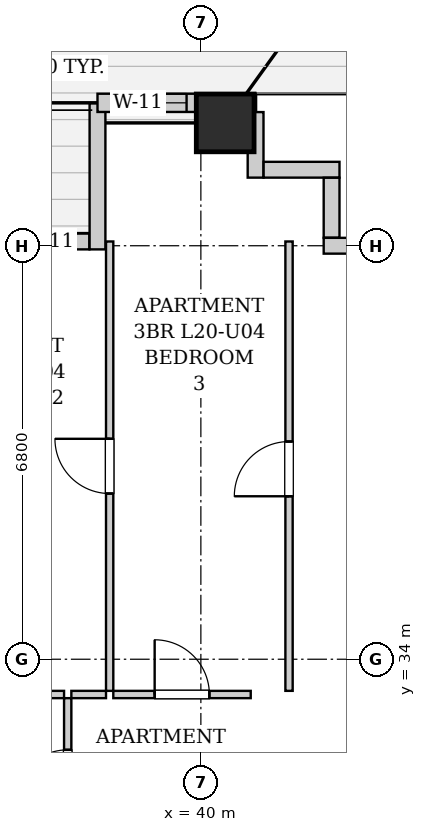
"""IFC4 building model, lengths in metres.
Left out: names, types, materials, properties, quantities, classifications, styles, units other than length and angle.
Written with IfcOpenShell. Run it as: python <this file> out.ifc"""

import sys

from ifc_helpers import new_model, si_unit, direction, frame, frame_2d, origin, origin_2d, place, context, subcontext, project, spatial, rectangle, extrude, element, fill, save


model = new_model("IFC4")
c1 = context("Model", 3, precision=1e-05, world=origin(), true_north=direction((0.0, 1.0)))
c2 = subcontext(c1, "Body", "Model", "MODEL_VIEW")
j1 = project(units=[si_unit("LENGTHUNIT", "METRE"), si_unit("PLANEANGLEUNIT", "RADIAN")], contexts=[c1])
p1 = place(None, origin())
s1 = spatial("IfcSite", under=j1, at=p1, CompositionType="ELEMENT")
p2 = place(p1, origin())
s2 = spatial("IfcBuilding", under=s1, at=p2, CompositionType="ELEMENT")
p3 = place(p2, frame((0.0, 0.0, 75.1)))
s3 = spatial("IfcBuildingStorey", under=s2, at=p3, CompositionType="ELEMENT", Elevation=75.1)
p4 = place(p3, frame((40.4, 42.82, 0.0), z_axis=(0.0, 0.0, 1.0), x_axis=(1.0, 0.0, 0.0)))
e1 = element("IfcColumn", 1, at=p4, inside=s3, PredefinedType="COLUMN", context=c2, shape_type="SweptSolid", body=[
    extrude(rectangle(XDim=0.95, YDim=0.95, at=origin_2d()), origin(), (0.0, 0.0, 1.0), 3.2),
])
p5 = place(p3, frame((33.834, 40.87, 0.0), z_axis=(0.0, 0.0, 1.0), x_axis=(1.0, 0.0, 0.0)))
e2 = element("IfcWall", 2, at=p5, inside=s3, PredefinedType="SOLIDWALL", context=c2, shape_type="SweptSolid", body=[
    extrude(rectangle(XDim=4.332, YDim=0.26, at=frame_2d((2.166, 0.0))), origin(), (0.0, 0.0, 1.0), 2.94),
])
p6 = place(p5, frame((1.616, 0.0, 0.0)))
e3 = element("IfcOpeningElement", 3, at=p6, cuts=e2, PredefinedType="OPENING", context=c2, shape_type="SweptSolid", body=[
    extrude(rectangle(XDim=1.1, YDim=2.0, at=frame_2d((0.55, 1.0))), frame((0.0, 0.14, 0.0), z_axis=(0.0, -1.0, 0.0), x_axis=(1.0, 0.0, 0.0)), (0.0, 0.0, 1.0), 0.28),
])
p7 = place(p5, frame((2.876, 0.0, 0.55)))
e4 = element("IfcOpeningElement", 4, at=p7, cuts=e2, PredefinedType="OPENING", context=c2, shape_type="SweptSolid", body=[
    extrude(rectangle(XDim=0.85, YDim=1.2, at=frame_2d((0.425, 0.6))), frame((0.0, 0.14, 0.0), z_axis=(0.0, -1.0, 0.0), x_axis=(1.0, 0.0, 0.0)), (0.0, 0.0, 1.0), 0.28),
])
p8 = place(p3, frame((38.3, 40.74, 0.0), z_axis=(0.0, 0.0, 1.0), x_axis=(0.0, 1.0, 0.0)))
e5 = element("IfcWall", 5, at=p8, inside=s3, PredefinedType="SOLIDWALL", context=c2, shape_type="SweptSolid", body=[
    extrude(rectangle(XDim=2.4, YDim=0.26, at=frame_2d((1.2, 0.0))), origin(), (0.0, 0.0, 1.0), 2.94),
])
p9 = place(p3, frame((38.3, 43.15, 0.0), z_axis=(0.0, 0.0, 1.0), x_axis=(1.0, 0.0, 0.0)))
e6 = element("IfcWall", 6, at=p9, inside=s3, PredefinedType="SOLIDWALL", context=c2, shape_type="SweptSolid", body=[
    extrude(rectangle(XDim=2.6, YDim=0.3, at=frame_2d((1.3, 0.0))), origin(), (0.0, 0.0, 1.0), 2.94),
])
p10 = place(p9, frame((0.615, 0.0, 0.55)))
e7 = element("IfcOpeningElement", 7, at=p10, cuts=e6, PredefinedType="OPENING", context=c2, shape_type="SweptSolid", body=[
    extrude(rectangle(XDim=0.85, YDim=1.2, at=frame_2d((0.425, 0.6))), frame((0.0, 0.16, 0.0), z_axis=(0.0, -1.0, 0.0), x_axis=(1.0, 0.0, 0.0)), (0.0, 0.0, 1.0), 0.32),
])
p11 = place(p3, frame((40.9, 42.998, 0.0), z_axis=(0.0, 0.0, 1.0), x_axis=(0.0, -1.0, 0.0)))
e8 = element("IfcWall", 8, at=p11, inside=s3, PredefinedType="SOLIDWALL", context=c2, shape_type="SweptSolid", body=[
    extrude(rectangle(XDim=1.078, YDim=0.26, at=frame_2d((0.539, 0.0))), origin(), (0.0, 0.0, 1.0), 2.94),
])
p12 = place(p3, frame((41.032, 42.05, 0.0), z_axis=(0.0, 0.0, 1.0), x_axis=(1.0, 0.0, 0.0)))
e9 = element("IfcWall", 9, at=p12, inside=s3, PredefinedType="SOLIDWALL", context=c2, shape_type="SweptSolid", body=[
    extrude(rectangle(XDim=1.248, YDim=0.26, at=frame_2d((0.624, 0.0))), origin(), (0.0, 0.0, 1.0), 2.94),
])
p13 = place(p3, frame((42.15, 41.918, 0.0), z_axis=(0.0, 0.0, 1.0), x_axis=(0.0, -1.0, 0.0)))
e10 = element("IfcWall", 10, at=p13, inside=s3, PredefinedType="SOLIDWALL", context=c2, shape_type="SweptSolid", body=[
    extrude(rectangle(XDim=0.986, YDim=0.26, at=frame_2d((0.493, 0.0))), origin(), (0.0, 0.0, 1.0), 2.94),
])
p14 = place(p3, frame((42.02, 40.8, 0.0), z_axis=(0.0, 0.0, 1.0), x_axis=(1.0, 0.0, 0.0)))
e11 = element("IfcWall", 11, at=p14, inside=s3, PredefinedType="SOLIDWALL", context=c2, shape_type="SweptSolid", body=[
    extrude(rectangle(XDim=1.078, YDim=0.26, at=frame_2d((0.539, 0.0))), origin(), (0.0, 0.0, 1.0), 2.94),
])
p15 = place(p3, frame((37.81, 30.76, 0.0), z_axis=(0.0, 0.0, 1.0), x_axis=(0.0, 1.0, 0.0)))
e12 = element("IfcWall", 12, at=p15, inside=s3, PredefinedType="PARTITIONING", context=c2, shape_type="SweptSolid", body=[
    extrude(rectangle(XDim=2.6, YDim=0.12, at=frame_2d((1.3, 0.0))), origin(), (0.0, 0.0, 1.0), 2.94),
])
p16 = place(p15, frame((0.85, 0.0, 0.0)))
e13 = element("IfcOpeningElement", 13, at=p16, cuts=e12, PredefinedType="OPENING", context=c2, shape_type="SweptSolid", body=[
    extrude(rectangle(XDim=0.9, YDim=2.05, at=frame_2d((0.45, 1.025))), frame((0.0, 0.07, 0.0), z_axis=(0.0, -1.0, 0.0), x_axis=(1.0, 0.0, 0.0)), (0.0, 0.0, 1.0), 0.14),
])
p17 = place(p3, frame((34.89, 33.42, 0.0), z_axis=(0.0, 0.0, 1.0), x_axis=(1.0, 0.0, 0.0)))
e14 = element("IfcWall", 14, at=p17, inside=s3, PredefinedType="PARTITIONING", context=c2, shape_type="SweptSolid", body=[
    extrude(rectangle(XDim=2.86, YDim=0.12, at=frame_2d((1.43, 0.0))), origin(), (0.0, 0.0, 1.0), 2.94),
])
p18 = place(p17, frame((0.98, 0.0, 0.0)))
e15 = element("IfcOpeningElement", 15, at=p18, cuts=e14, PredefinedType="OPENING", context=c2, shape_type="SweptSolid", body=[
    extrude(rectangle(XDim=0.9, YDim=2.05, at=frame_2d((0.45, 1.025))), frame((0.0, 0.07, 0.0), z_axis=(0.0, -1.0, 0.0), x_axis=(1.0, 0.0, 0.0)), (0.0, 0.0, 1.0), 0.14),
])
p19 = place(p3, frame((37.87, 33.42, 0.0), z_axis=(0.0, 0.0, 1.0), x_axis=(1.0, 0.0, 0.0)))
e16 = element("IfcWall", 16, at=p19, inside=s3, PredefinedType="PARTITIONING", context=c2, shape_type="SweptSolid", body=[
    extrude(rectangle(XDim=0.57, YDim=0.12, at=frame_2d((0.285, 0.0))), origin(), (0.0, 0.0, 1.0), 2.94),
])
p20 = place(p3, frame((38.56, 33.42, 0.0), z_axis=(0.0, 0.0, 1.0), x_axis=(1.0, 0.0, 0.0)))
e17 = element("IfcWall", 17, at=p20, inside=s3, PredefinedType="PARTITIONING", context=c2, shape_type="SweptSolid", body=[
    extrude(rectangle(XDim=2.26, YDim=0.12, at=frame_2d((1.13, 0.0))), origin(), (0.0, 0.0, 1.0), 2.94),
])
p21 = place(p20, frame((0.68, 0.0, 0.0)))
e18 = element("IfcOpeningElement", 18, at=p21, cuts=e17, PredefinedType="OPENING", context=c2, shape_type="SweptSolid", body=[
    extrude(rectangle(XDim=0.9, YDim=2.05, at=frame_2d((0.45, 1.025))), frame((0.0, 0.07, 0.0), z_axis=(0.0, -1.0, 0.0), x_axis=(1.0, 0.0, 0.0)), (0.0, 0.0, 1.0), 0.14),
])
p22 = place(p3, frame((38.5, 33.48, 0.0), z_axis=(0.0, 0.0, 1.0), x_axis=(0.0, 1.0, 0.0)))
e19 = element("IfcWall", 19, at=p22, inside=s3, PredefinedType="PARTITIONING", context=c2, shape_type="SweptSolid", body=[
    extrude(rectangle(XDim=7.39, YDim=0.12, at=frame_2d((3.695, 0.0))), origin(), (0.0, 0.0, 1.0), 2.94),
])
p23 = place(p22, frame((3.245, 0.0, 0.0)))
e20 = element("IfcOpeningElement", 20, at=p23, cuts=e19, PredefinedType="OPENING", context=c2, shape_type="SweptSolid", body=[
    extrude(rectangle(XDim=0.9, YDim=2.05, at=frame_2d((0.45, 1.025))), frame((0.0, 0.07, 0.0), z_axis=(0.0, -1.0, 0.0), x_axis=(1.0, 0.0, 0.0)), (0.0, 0.0, 1.0), 0.14),
])
p24 = place(p3, frame((41.45, 33.48, 0.0), z_axis=(0.0, 0.0, 1.0), x_axis=(0.0, 1.0, 0.0)))
e21 = element("IfcWall", 21, at=p24, inside=s3, PredefinedType="PARTITIONING", context=c2, shape_type="SweptSolid", body=[
    extrude(rectangle(XDim=7.39, YDim=0.12, at=frame_2d((3.695, 0.0))), origin(), (0.0, 0.0, 1.0), 2.94),
])
p25 = place(p24, frame((3.2, 0.0, 0.0)))
e22 = element("IfcOpeningElement", 22, at=p25, cuts=e21, PredefinedType="OPENING", context=c2, shape_type="SweptSolid", body=[
    extrude(rectangle(XDim=0.9, YDim=2.05, at=frame_2d((0.45, 1.025))), frame((0.0, 0.07, 0.0), z_axis=(0.0, -1.0, 0.0), x_axis=(1.0, 0.0, 0.0)), (0.0, 0.0, 1.0), 0.14),
])
p26 = place(p16, origin())
e23 = element("IfcDoor", 23, at=p26, inside=s3, OperationType="SINGLE_SWING_LEFT", PredefinedType="DOOR", context=c2, shape_type="SweptSolid", body=[
    extrude(rectangle(XDim=0.9, YDim=2.05, at=frame_2d((0.45, 1.025))), frame((0.0, 0.025, 0.0), z_axis=(0.0, -1.0, 0.0), x_axis=(1.0, 0.0, 0.0)), (0.0, 0.0, 1.0), 0.05),
])
fill(e13, e23)
p27 = place(p21, origin())
e24 = element("IfcDoor", 24, at=p27, inside=s3, OperationType="SINGLE_SWING_LEFT", PredefinedType="DOOR", context=c2, shape_type="SweptSolid", body=[
    extrude(rectangle(XDim=0.9, YDim=2.05, at=frame_2d((0.45, 1.025))), frame((0.0, 0.025, 0.0), z_axis=(0.0, -1.0, 0.0), x_axis=(1.0, 0.0, 0.0)), (0.0, 0.0, 1.0), 0.05),
])
fill(e18, e24)
p28 = place(p23, origin())
e25 = element("IfcDoor", 25, at=p28, inside=s3, OperationType="SINGLE_SWING_RIGHT", PredefinedType="DOOR", context=c2, shape_type="SweptSolid", body=[
    extrude(rectangle(XDim=0.9, YDim=2.05, at=frame_2d((0.45, 1.025))), frame((0.0, 0.025, 0.0), z_axis=(0.0, -1.0, 0.0), x_axis=(1.0, 0.0, 0.0)), (0.0, 0.0, 1.0), 0.05),
])
fill(e20, e25)
p29 = place(p25, origin())
e26 = element("IfcDoor", 26, at=p29, inside=s3, OperationType="SINGLE_SWING_LEFT", PredefinedType="DOOR", context=c2, shape_type="SweptSolid", body=[
    extrude(rectangle(XDim=0.9, YDim=2.05, at=frame_2d((0.45, 1.025))), frame((0.0, 0.025, 0.0), z_axis=(0.0, -1.0, 0.0), x_axis=(1.0, 0.0, 0.0)), (0.0, 0.0, 1.0), 0.05),
])
fill(e22, e26)
p30 = place(p10, origin())
e27 = element("IfcWindow", 27, at=p30, inside=s3, PartitioningType="SINGLE_PANEL", PredefinedType="WINDOW", context=c2, shape_type="SweptSolid", body=[
    extrude(rectangle(XDim=0.85, YDim=1.2, at=frame_2d((0.425, 0.6))), frame((0.0, 0.03, 0.0), z_axis=(0.0, -1.0, 0.0), x_axis=(1.0, 0.0, 0.0)), (0.0, 0.0, 1.0), 0.06),
])
fill(e7, e27)
save(model, sys.argv[1])
